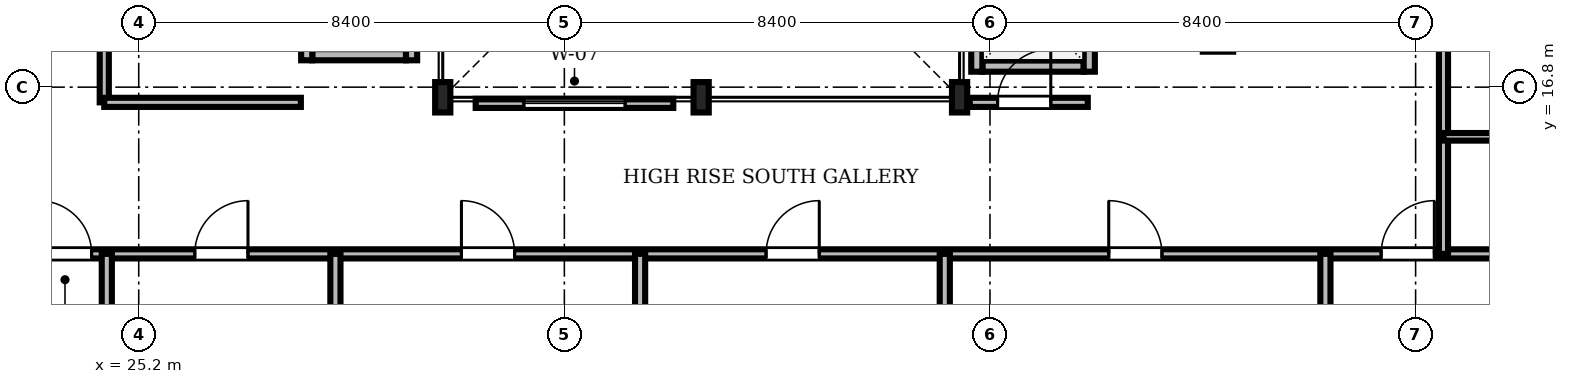
"""IFC4 building model, lengths in metres.
Left out: names, types, materials, properties, quantities, classifications, styles, units other than length and angle.
Written with IfcOpenShell. Run it as: python <this file> out.ifc"""

import sys

from ifc_helpers import new_model, si_unit, direction, frame, frame_2d, origin, origin_2d, place, context, subcontext, project, spatial, rectangle, i_section, extrude, source, transform, mapped, element, fill, save


model = new_model("IFC4")
c1 = context("Model", 3, precision=1e-05, world=origin(), true_north=direction((0.0, 1.0)))
c2 = subcontext(c1, "Body", "Model", "MODEL_VIEW")
j1 = project(units=[si_unit("LENGTHUNIT", "METRE"), si_unit("PLANEANGLEUNIT", "RADIAN")], contexts=[c1])
p1 = place(None, origin())
s1 = spatial("IfcSite", under=j1, at=p1, CompositionType="ELEMENT")
p2 = place(p1, origin())
s2 = spatial("IfcBuilding", under=s1, at=p2, CompositionType="ELEMENT")
p3 = place(p2, frame((0.0, 0.0, 254.55)))
s3 = spatial("IfcBuildingStorey", under=s2, at=p3, CompositionType="ELEMENT", Elevation=254.55)
m1 = source(origin(), c2, "Body", "SweptSolid", [
    extrude(i_section(OverallWidth=0.3, OverallDepth=0.6, WebThickness=0.015, FlangeThickness=0.03, FilletRadius=0.027, at=origin_2d()), origin(), (0.0, 0.0, 1.0), 3.65),
])
for number, where, z_axis, x_axis in (
    (1, (31.2, 16.6, 0.0), (0.0, 0.0, 1.0), (1.0, 0.0, 0.0)),
    (2, (36.3, 16.6, 0.0), (0.0, 0.0, 1.0), (1.0, 0.0, 0.0)),
    (3, (41.4, 16.6, 0.0), (0.0, 0.0, 1.0), (1.0, 0.0, 0.0)),
):
    element("IfcColumn", number, at=place(p3, frame(where, z_axis=z_axis, x_axis=x_axis)), inside=s3, PredefinedType="COLUMN", context=c2, shape_type="MappedRepresentation", body=[
        mapped(m1, transform((0.0, 0.0, 0.0), scale=1.0)),
    ])
m2 = source(origin(), c2, "Body", "SweptSolid", [
    extrude(rectangle(XDim=2.0, YDim=0.22, at=frame_2d((1.0, 0.0))), origin(), (0.0, 0.0, 1.0), 3.65),
])
p4 = place(p3, frame((41.85, 17.215, 0.0), z_axis=(0.0, 0.0, 1.0), x_axis=(1.0, 0.0, 0.0)))
e4 = element("IfcWall", 4, at=p4, inside=s3, PredefinedType="SOLIDWALL", context=c2, shape_type="MappedRepresentation", body=[
    mapped(m2, transform((0.0, 0.0, 0.0), scale=1.0)),
])
m3 = source(origin(), c2, "Body", "SweptSolid", [
    extrude(rectangle(XDim=2.19, YDim=0.22, at=frame_2d((1.095, 0.0))), origin(), (0.0, 0.0, 1.0), 3.65),
])
p5 = place(p3, frame((41.74, 17.105, 0.0), z_axis=(0.0, 0.0, 1.0), x_axis=(0.0, 1.0, 0.0)))
e5 = element("IfcWall", 5, at=p5, inside=s3, PredefinedType="SOLIDWALL", context=c2, shape_type="MappedRepresentation", body=[
    mapped(m3, transform((0.0, 0.0, 0.0), scale=1.0)),
])
p6 = place(p3, frame((43.96, 17.105, 0.0), z_axis=(0.0, 0.0, 1.0), x_axis=(0.0, 1.0, 0.0)))
e6 = element("IfcWall", 6, at=p6, inside=s3, PredefinedType="SOLIDWALL", context=c2, shape_type="MappedRepresentation", body=[
    mapped(m3, transform((0.0, 0.0, 0.0), scale=1.0)),
])
m4 = source(origin(), c2, "Body", "SweptSolid", [
    extrude(rectangle(XDim=1.1, YDim=2.2, at=frame_2d((0.55, 1.1))), frame((0.0, 0.12, 0.0), z_axis=(0.0, -1.0, 0.0), x_axis=(1.0, 0.0, 0.0)), (0.0, 0.0, 1.0), 0.24),
])
p7 = place(p6, frame((0.545, 0.0, 0.0)))
e7 = element("IfcOpeningElement", 7, at=p7, cuts=e6, PredefinedType="OPENING", context=c2, shape_type="MappedRepresentation", body=[
    mapped(m4, transform((0.0, 0.0, 0.0), scale=1.0)),
])
m5 = source(origin(), c2, "Body", "SweptSolid", [
    extrude(rectangle(XDim=1.85, YDim=0.22, at=frame_2d((0.925, 0.0))), origin(), (0.0, 0.0, 1.0), 3.65),
])
p8 = place(p3, frame((28.625, 17.44, 0.0), z_axis=(0.0, 0.0, 1.0), x_axis=(1.0, 0.0, 0.0)))
e8 = element("IfcWall", 8, at=p8, inside=s3, PredefinedType="SOLIDWALL", context=c2, shape_type="MappedRepresentation", body=[
    mapped(m5, transform((0.0, 0.0, 0.0), scale=1.0)),
])
m6 = source(origin(), c2, "Body", "SweptSolid", [
    extrude(rectangle(XDim=2.54, YDim=0.22, at=frame_2d((1.27, 0.0))), origin(), (0.0, 0.0, 1.0), 3.65),
])
for number, where, z_axis, x_axis in (
    (9, (28.515, 17.33, 0.0), (0.0, 0.0, 1.0), (0.0, 1.0, 0.0)),
    (10, (30.585, 17.33, 0.0), (0.0, 0.0, 1.0), (0.0, 1.0, 0.0)),
):
    element("IfcWall", number, at=place(p3, frame(where, z_axis=z_axis, x_axis=x_axis)), inside=s3, PredefinedType="SOLIDWALL", context=c2, shape_type="MappedRepresentation", body=[
        mapped(m6, transform((0.0, 0.0, 0.0), scale=1.0)),
    ])
m7 = source(origin(), c2, "Body", "SweptSolid", [
    extrude(rectangle(XDim=46.156, YDim=0.18, at=frame_2d((23.078, 0.0))), origin(), (0.0, 0.0, 1.0), 2.892),
])
p9 = place(p3, frame((15.922, 13.51, 0.0), z_axis=(0.0, 0.0, 1.0), x_axis=(1.0, 0.0, 0.0)))
e11 = element("IfcWall", 11, at=p9, inside=s3, PredefinedType="PARTITIONING", context=c2, shape_type="MappedRepresentation", body=[
    mapped(m7, transform((0.0, 0.0, 0.0), scale=1.0)),
])
m8 = source(origin(), c2, "Body", "SweptSolid", [
    extrude(rectangle(XDim=1.05, YDim=2.2, at=frame_2d((0.525, 1.1))), frame((0.0, 0.1, 0.0), z_axis=(0.0, -1.0, 0.0), x_axis=(1.0, 0.0, 0.0)), (0.0, 0.0, 1.0), 0.2),
])
p10 = place(p9, frame((7.298, 0.0, 0.0)))
e12 = element("IfcOpeningElement", 12, at=p10, cuts=e11, PredefinedType="OPENING", context=c2, shape_type="MappedRepresentation", body=[
    mapped(m8, transform((0.0, 0.0, 0.0), scale=1.0)),
])
p11 = place(p9, frame((10.384, 0.0, 0.0)))
e13 = element("IfcOpeningElement", 13, at=p11, cuts=e11, PredefinedType="OPENING", context=c2, shape_type="MappedRepresentation", body=[
    mapped(m8, transform((0.0, 0.0, 0.0), scale=1.0)),
])
p12 = place(p9, frame((15.647, 0.0, 0.0)))
e14 = element("IfcOpeningElement", 14, at=p12, cuts=e11, PredefinedType="OPENING", context=c2, shape_type="MappedRepresentation", body=[
    mapped(m8, transform((0.0, 0.0, 0.0), scale=1.0)),
])
p13 = place(p9, frame((21.659, 0.0, 0.0)))
e15 = element("IfcOpeningElement", 15, at=p13, cuts=e11, PredefinedType="OPENING", context=c2, shape_type="MappedRepresentation", body=[
    mapped(m8, transform((0.0, 0.0, 0.0), scale=1.0)),
])
p14 = place(p9, frame((28.422, 0.0, 0.0)))
e16 = element("IfcOpeningElement", 16, at=p14, cuts=e11, PredefinedType="OPENING", context=c2, shape_type="MappedRepresentation", body=[
    mapped(m8, transform((0.0, 0.0, 0.0), scale=1.0)),
])
p15 = place(p9, frame((33.798, 0.0, 0.0)))
e17 = element("IfcOpeningElement", 17, at=p15, cuts=e11, PredefinedType="OPENING", context=c2, shape_type="MappedRepresentation", body=[
    mapped(m8, transform((0.0, 0.0, 0.0), scale=1.0)),
])
m9 = source(origin(), c2, "Body", "SweptSolid", [
    extrude(rectangle(XDim=27.59, YDim=0.18, at=frame_2d((13.795, 0.0))), origin(), (0.0, 0.0, 1.0), 3.092),
])
p16 = place(p3, frame((50.95, 13.51, 0.0), z_axis=(0.0, 0.0, 1.0), x_axis=(0.0, 1.0, 0.0)))
e18 = element("IfcWall", 18, at=p16, inside=s3, PredefinedType="PARTITIONING", context=c2, shape_type="MappedRepresentation", body=[
    mapped(m9, transform((0.0, 0.0, 0.0), scale=1.0)),
])
p17 = place(p16, frame((4.086, 0.0, 0.0)))
e19 = element("IfcOpeningElement", 19, at=p17, cuts=e18, PredefinedType="OPENING", context=c2, shape_type="MappedRepresentation", body=[
    mapped(m8, transform((0.0, 0.0, 0.0), scale=1.0)),
])
p18 = place(p16, frame((9.744, 0.0, 0.0)))
e20 = element("IfcOpeningElement", 20, at=p18, cuts=e18, PredefinedType="OPENING", context=c2, shape_type="MappedRepresentation", body=[
    mapped(m8, transform((0.0, 0.0, 0.0), scale=1.0)),
])
p19 = place(p16, frame((17.771, 0.0, 0.0)))
e21 = element("IfcOpeningElement", 21, at=p19, cuts=e18, PredefinedType="OPENING", context=c2, shape_type="MappedRepresentation", body=[
    mapped(m8, transform((0.0, 0.0, 0.0), scale=1.0)),
])
p20 = place(p16, frame((24.614, 0.0, 0.0)))
e22 = element("IfcOpeningElement", 22, at=p20, cuts=e18, PredefinedType="OPENING", context=c2, shape_type="MappedRepresentation", body=[
    mapped(m8, transform((0.0, 0.0, 0.0), scale=1.0)),
])
m10 = source(origin(), c2, "Body", "SweptSolid", [
    extrude(rectangle(XDim=3.55, YDim=0.18, at=frame_2d((1.775, 0.0))), origin(), (0.0, 0.0, 1.0), 3.65),
])
p21 = place(p3, frame((24.52, 16.5, 0.0), z_axis=(0.0, 0.0, 1.0), x_axis=(0.0, 1.0, 0.0)))
e23 = element("IfcWall", 23, at=p21, inside=s3, PredefinedType="PARTITIONING", context=c2, shape_type="MappedRepresentation", body=[
    mapped(m10, transform((0.0, 0.0, 0.0), scale=1.0)),
])
p22 = place(p21, frame((1.15, 0.0, 0.0)))
e24 = element("IfcOpeningElement", 24, at=p22, cuts=e23, PredefinedType="OPENING", context=c2, shape_type="MappedRepresentation", body=[
    mapped(m8, transform((0.0, 0.0, 0.0), scale=1.0)),
])
m11 = source(origin(), c2, "Body", "SweptSolid", [
    extrude(rectangle(XDim=2.33, YDim=0.18, at=frame_2d((1.165, 0.0))), origin(), (0.0, 0.0, 1.0), 3.092),
])
p23 = place(p3, frame((41.6, 16.5, 0.0), z_axis=(0.0, 0.0, 1.0), x_axis=(1.0, 0.0, 0.0)))
e25 = element("IfcWall", 25, at=p23, inside=s3, PredefinedType="PARTITIONING", context=c2, shape_type="MappedRepresentation", body=[
    mapped(m11, transform((0.0, 0.0, 0.0), scale=1.0)),
])
p24 = place(p23, frame((0.55, 0.0, 0.0)))
e26 = element("IfcOpeningElement", 26, at=p24, cuts=e25, PredefinedType="OPENING", context=c2, shape_type="MappedRepresentation", body=[
    mapped(m8, transform((0.0, 0.0, 0.0), scale=1.0)),
])
m12 = source(origin(), c2, "Body", "SweptSolid", [
    extrude(rectangle(XDim=11.388, YDim=0.2, at=frame_2d((5.694, 0.0))), origin(), (0.0, 0.0, 1.0), 2.892),
])
for number, where, z_axis, x_axis in (
    (27, (24.57, 2.122, 0.0), (0.0, 0.0, 1.0), (0.0, 1.0, 0.0)),
    (28, (29.082, 2.122, 0.0), (0.0, 0.0, 1.0), (0.0, 1.0, 0.0)),
    (29, (35.095, 2.122, 0.0), (0.0, 0.0, 1.0), (0.0, 1.0, 0.0)),
):
    element("IfcWall", number, at=place(p3, frame(where, z_axis=z_axis, x_axis=x_axis)), inside=s3, PredefinedType="PARTITIONING", context=c2, shape_type="MappedRepresentation", body=[
        mapped(m12, transform((0.0, 0.0, 0.0), scale=1.0)),
    ])
m13 = source(origin(), c2, "Body", "SweptSolid", [
    extrude(rectangle(XDim=11.58, YDim=0.2, at=frame_2d((5.79, 0.0))), origin(), (0.0, 0.0, 1.0), 2.892),
])
p25 = place(p3, frame((41.108, 1.93, 0.0), z_axis=(0.0, 0.0, 1.0), x_axis=(0.0, 1.0, 0.0)))
e30 = element("IfcWall", 30, at=p25, inside=s3, PredefinedType="PARTITIONING", context=c2, shape_type="MappedRepresentation", body=[
    mapped(m13, transform((0.0, 0.0, 0.0), scale=1.0)),
])
p26 = place(p3, frame((48.62, 2.122, 0.0), z_axis=(0.0, 0.0, 1.0), x_axis=(0.0, 1.0, 0.0)))
e31 = element("IfcWall", 31, at=p26, inside=s3, PredefinedType="PARTITIONING", context=c2, shape_type="MappedRepresentation", body=[
    mapped(m12, transform((0.0, 0.0, 0.0), scale=1.0)),
])
m14 = source(origin(), c2, "Body", "SweptSolid", [
    extrude(rectangle(XDim=3.88, YDim=0.18, at=frame_2d((1.94, 0.0))), origin(), (0.0, 0.0, 1.0), 3.65),
])
p27 = place(p3, frame((24.52, 16.5, 0.0), z_axis=(0.0, 0.0, 1.0), x_axis=(1.0, 0.0, 0.0)))
e32 = element("IfcWall", 32, at=p27, inside=s3, PredefinedType="PARTITIONING", context=c2, shape_type="MappedRepresentation", body=[
    mapped(m14, transform((0.0, 0.0, 0.0), scale=1.0)),
])
m15 = source(origin(), c2, "Body", "SweptSolid", [
    extrude(rectangle(XDim=2.36, YDim=0.15, at=frame_2d((1.18, 0.0))), origin(), (0.0, 0.0, 1.0), 3.65),
])
p28 = place(p3, frame((50.95, 15.82, 0.0), z_axis=(0.0, 0.0, 1.0), x_axis=(1.0, 0.0, 0.0)))
e33 = element("IfcWall", 33, at=p28, inside=s3, PredefinedType="PARTITIONING", context=c2, shape_type="MappedRepresentation", body=[
    mapped(m15, transform((0.0, 0.0, 0.0), scale=1.0)),
])
m16 = source(origin(), c2, "Body", "SweptSolid", [
    extrude(rectangle(XDim=3.9, YDim=0.18, at=frame_2d((1.95, 0.0))), origin(), (0.0, 0.0, 1.0), 3.192),
])
p29 = place(p3, frame((31.85, 16.48, 0.0), z_axis=(0.0, 0.0, 1.0), x_axis=(1.0, 0.0, 0.0)))
e34 = element("IfcWall", 34, at=p29, inside=s3, PredefinedType="PARTITIONING", context=c2, shape_type="MappedRepresentation", body=[
    mapped(m16, transform((0.0, 0.0, 0.0), scale=1.0)),
])
m17 = source(origin(), c2, "Body", "SweptSolid", [
    extrude(rectangle(XDim=2.0, YDim=1.9, at=frame_2d((1.0, 0.95))), frame((0.0, 0.1, 0.0), z_axis=(0.0, -1.0, 0.0), x_axis=(1.0, 0.0, 0.0)), (0.0, 0.0, 1.0), 0.2),
])
p30 = place(p29, frame((0.95, 0.0, 0.55)))
e35 = element("IfcOpeningElement", 35, at=p30, cuts=e34, PredefinedType="OPENING", context=c2, shape_type="MappedRepresentation", body=[
    mapped(m17, transform((0.0, 0.0, 0.0), scale=1.0)),
])
m18 = source(origin(), c2, "Body", "SweptSolid", [
    extrude(rectangle(XDim=1.05, YDim=2.2, at=frame_2d((0.525, 1.1))), frame((0.0, 0.025, 0.0), z_axis=(0.0, -1.0, 0.0), x_axis=(1.0, 0.0, 0.0)), (0.0, 0.0, 1.0), 0.05),
])
p31 = place(p10, origin())
e36 = element("IfcDoor", 36, at=p31, inside=s3, OperationType="SINGLE_SWING_LEFT", PredefinedType="DOOR", context=c2, shape_type="MappedRepresentation", body=[
    mapped(m18, transform((0.0, 0.0, 0.0), scale=1.0)),
])
fill(e12, e36)
p32 = place(p11, origin())
e37 = element("IfcDoor", 37, at=p32, inside=s3, OperationType="SINGLE_SWING_RIGHT", PredefinedType="DOOR", context=c2, shape_type="MappedRepresentation", body=[
    mapped(m18, transform((0.0, 0.0, 0.0), scale=1.0)),
])
fill(e13, e37)
p33 = place(p12, origin())
e38 = element("IfcDoor", 38, at=p33, inside=s3, OperationType="SINGLE_SWING_LEFT", PredefinedType="DOOR", context=c2, shape_type="MappedRepresentation", body=[
    mapped(m18, transform((0.0, 0.0, 0.0), scale=1.0)),
])
fill(e14, e38)
p34 = place(p13, origin())
e39 = element("IfcDoor", 39, at=p34, inside=s3, OperationType="SINGLE_SWING_RIGHT", PredefinedType="DOOR", context=c2, shape_type="MappedRepresentation", body=[
    mapped(m18, transform((0.0, 0.0, 0.0), scale=1.0)),
])
fill(e15, e39)
p35 = place(p14, origin())
e40 = element("IfcDoor", 40, at=p35, inside=s3, OperationType="SINGLE_SWING_LEFT", PredefinedType="DOOR", context=c2, shape_type="MappedRepresentation", body=[
    mapped(m18, transform((0.0, 0.0, 0.0), scale=1.0)),
])
fill(e16, e40)
p36 = place(p15, origin())
e41 = element("IfcDoor", 41, at=p36, inside=s3, OperationType="SINGLE_SWING_RIGHT", PredefinedType="DOOR", context=c2, shape_type="MappedRepresentation", body=[
    mapped(m18, transform((0.0, 0.0, 0.0), scale=1.0)),
])
fill(e17, e41)
p37 = place(p24, origin())
e42 = element("IfcDoor", 42, at=p37, inside=s3, OperationType="SINGLE_SWING_RIGHT", PredefinedType="DOOR", context=c2, shape_type="MappedRepresentation", body=[
    mapped(m18, transform((0.0, 0.0, 0.0), scale=1.0)),
])
fill(e26, e42)
m19 = source(origin(), c2, "Body", "SweptSolid", [
    extrude(rectangle(XDim=2.0, YDim=1.9, at=frame_2d((1.0, 0.95))), frame((0.0, 0.03, 0.0), z_axis=(0.0, -1.0, 0.0), x_axis=(1.0, 0.0, 0.0)), (0.0, 0.0, 1.0), 0.06),
])
p38 = place(p30, origin())
e43 = element("IfcWindow", 43, at=p38, inside=s3, PartitioningType="SINGLE_PANEL", PredefinedType="WINDOW", context=c2, shape_type="MappedRepresentation", body=[
    mapped(m19, transform((0.0, 0.0, 0.0), scale=1.0)),
])
fill(e35, e43)
save(model, sys.argv[1])
